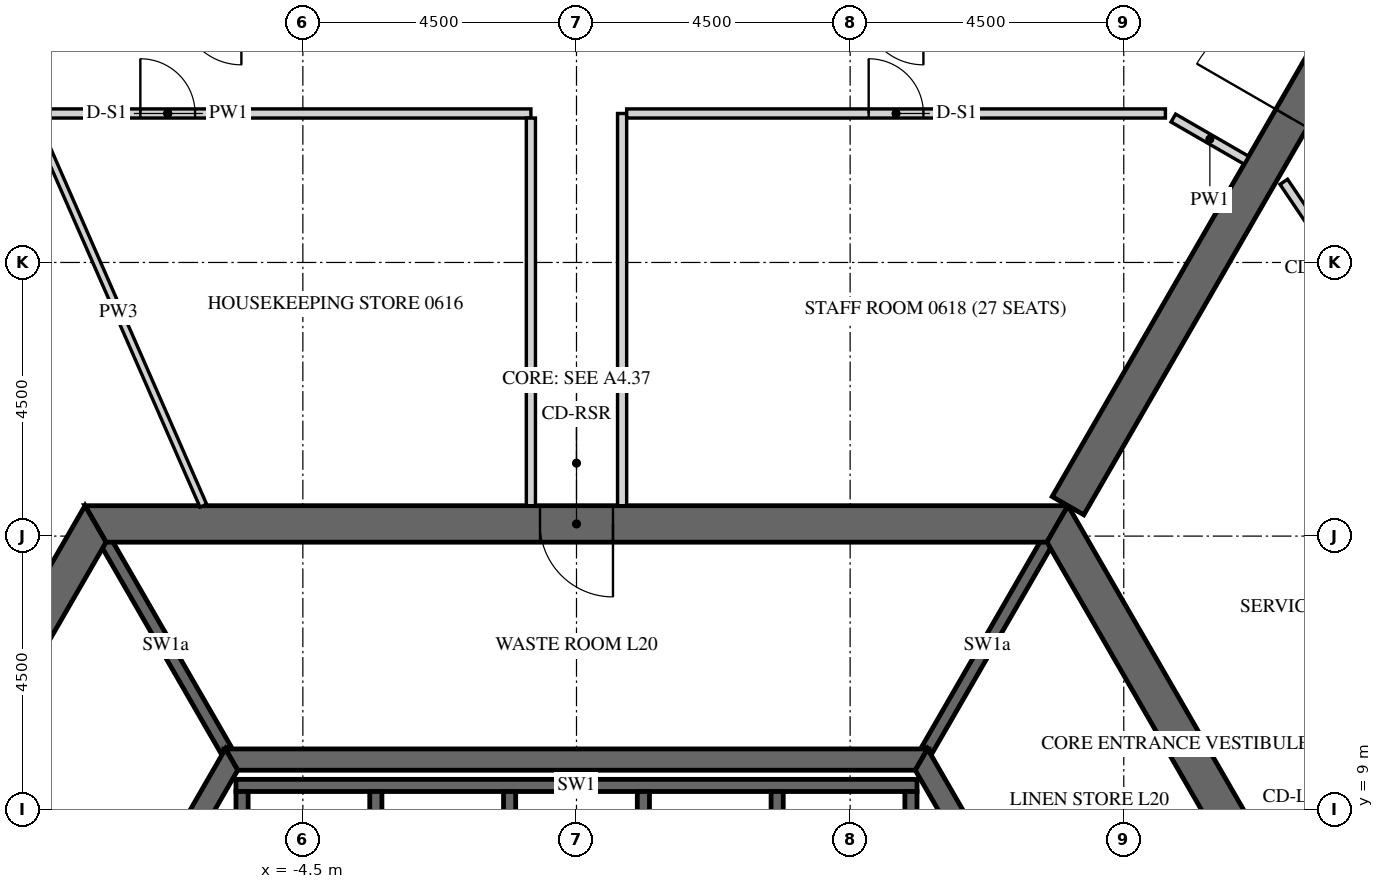
"""IFC4 building model, lengths in metres.
Left out: names, types, materials, properties, quantities, classifications, styles, units other than length and angle.
Written with IfcOpenShell. Run it as: python <this file> out.ifc"""

import sys

from ifc_helpers import new_model, si_unit, direction, frame, frame_2d, origin, place, context, subcontext, project, spatial, polyline, rectangle, outline, extrude, element, fill, save


model = new_model("IFC4")
c1 = context("Model", 3, precision=1e-05, world=origin(), true_north=direction((0.0, 1.0)))
c2 = subcontext(c1, "Body", "Model", "MODEL_VIEW")
j1 = project(units=[si_unit("LENGTHUNIT", "METRE"), si_unit("PLANEANGLEUNIT", "RADIAN")], contexts=[c1])
p1 = place(None, origin())
s1 = spatial("IfcSite", under=j1, at=p1, CompositionType="ELEMENT")
p2 = place(p1, origin())
s2 = spatial("IfcBuilding", under=s1, at=p2, CompositionType="ELEMENT")
p3 = place(p2, frame((0.0, 0.0, 92.1)))
s3 = spatial("IfcBuildingStorey", under=s2, at=p3, CompositionType="ELEMENT", Elevation=92.1)
p4 = place(p3, frame((-7.91, 13.7, -0.15), z_axis=(0.0, 0.0, 1.0), x_axis=(-0.499999880136, -0.866025472988, 0.0)))
e1 = element("IfcWall", 1, at=p4, inside=s3, PredefinedType="SHEAR", context=c2, shape_type="SweptSolid", body=[
    extrude(outline(polyline([(-0.173, -0.3), (15.993, -0.3), (15.646, 0.3), (0.173, 0.3), (-0.173, -0.3)])), origin(), (0.0, 0.0, 1.0), 3.9),
])
p5 = place(p4, frame((7.039, 0.0, 0.15)))
e2 = element("IfcOpeningElement", 2, at=p5, cuts=e1, PredefinedType="OPENING", context=c2, shape_type="SweptSolid", body=[
    extrude(rectangle(XDim=1.8, YDim=2.4, at=frame_2d((0.9, 1.2))), frame((0.0, 0.31, 0.0), z_axis=(0.0, -1.0, 0.0), x_axis=(1.0, 0.0, 0.0)), (0.0, 0.0, 1.0), 0.62),
])
p6 = place(p3, frame((15.819, 0.0, -0.15), z_axis=(0.0, 0.0, 1.0), x_axis=(-0.499999880136, 0.866025472988, 0.0)))
e3 = element("IfcWall", 3, at=p6, inside=s3, PredefinedType="SHEAR", context=c2, shape_type="SweptSolid", body=[
    extrude(outline(polyline([(-0.173, -0.3), (15.993, -0.3), (15.646, 0.3), (0.173, 0.3), (-0.173, -0.3)])), origin(), (0.0, 0.0, 1.0), 3.9),
])
p7 = place(p6, frame((6.981, 0.0, 0.15)))
e4 = element("IfcOpeningElement", 4, at=p7, cuts=e3, PredefinedType="OPENING", context=c2, shape_type="SweptSolid", body=[
    extrude(rectangle(XDim=1.8, YDim=2.4, at=frame_2d((0.9, 1.2))), frame((0.0, 0.31, 0.0), z_axis=(0.0, -1.0, 0.0), x_axis=(1.0, 0.0, 0.0)), (0.0, 0.0, 1.0), 0.62),
])
p8 = place(p3, frame((7.91, 13.7, -0.15), z_axis=(0.0, 0.0, 1.0), x_axis=(-1.0, 0.0, 0.0)))
e5 = element("IfcWall", 5, at=p8, inside=s3, PredefinedType="SHEAR", context=c2, shape_type="SweptSolid", body=[
    extrude(outline(polyline([(-0.173, -0.3), (15.993, -0.3), (15.646, 0.3), (0.173, 0.3), (-0.173, -0.3)])), origin(), (0.0, 0.0, 1.0), 3.9),
])
p9 = place(p8, frame((7.31, 0.0, 0.15)))
e6 = element("IfcOpeningElement", 6, at=p9, cuts=e5, PredefinedType="OPENING", context=c2, shape_type="SweptSolid", body=[
    extrude(rectangle(XDim=1.2, YDim=2.4, at=frame_2d((0.6, 1.2))), frame((0.0, 0.31, 0.0), z_axis=(0.0, -1.0, 0.0), x_axis=(1.0, 0.0, 0.0)), (0.0, 0.0, 1.0), 0.62),
])
p10 = place(p3, frame((8.083, 14.0, -0.15), z_axis=(0.0, 0.0, 1.0), x_axis=(0.499997680643, 0.866026742862, 0.0)))
e7 = element("IfcWall", 7, at=p10, inside=s3, PredefinedType="SHEAR", context=c2, shape_type="SweptSolid", body=[
    extrude(rectangle(XDim=16.509, YDim=0.6, at=frame_2d((8.254, 0.0))), origin(), (0.0, 0.0, 1.0), 3.9),
])
p11 = place(p10, frame((7.354, 0.0, 0.15)))
e8 = element("IfcOpeningElement", 8, at=p11, cuts=e7, PredefinedType="OPENING", context=c2, shape_type="SweptSolid", body=[
    extrude(rectangle(XDim=1.8, YDim=2.4, at=frame_2d((0.9, 1.2))), frame((0.0, 0.31, 0.0), z_axis=(0.0, -1.0, 0.0), x_axis=(1.0, 0.0, 0.0)), (0.0, 0.0, 1.0), 0.62),
])
p12 = place(p3, frame((-5.673, 9.825, -0.15), z_axis=(0.0, 0.0, 1.0), x_axis=(-0.499995046907, -0.866028263435, 0.0)))
e9 = element("IfcWall", 9, at=p12, inside=s3, PredefinedType="SHEAR", context=c2, shape_type="SweptSolid", body=[
    extrude(outline(polyline([(-0.101, -0.175), (11.446, -0.175), (11.244, 0.175), (0.101, 0.175), (-0.101, -0.175)])), origin(), (0.0, 0.0, 1.0), 3.9),
])
p13 = place(p12, frame((4.801, 0.0, 0.15)))
e10 = element("IfcOpeningElement", 10, at=p13, cuts=e9, PredefinedType="OPENING", context=c2, shape_type="SweptSolid", body=[
    extrude(rectangle(XDim=1.8, YDim=2.4, at=frame_2d((0.9, 1.2))), frame((0.0, 0.185, 0.0), z_axis=(0.0, -1.0, 0.0), x_axis=(1.0, 0.0, 0.0)), (0.0, 0.0, 1.0), 0.37),
])
p14 = place(p3, frame((11.345, 0.0, -0.15), z_axis=(0.0, 0.0, 1.0), x_axis=(-0.499995046907, 0.866028263435, 0.0)))
e11 = element("IfcWall", 11, at=p14, inside=s3, PredefinedType="SHEAR", context=c2, shape_type="SweptSolid", body=[
    extrude(outline(polyline([(-0.101, -0.175), (11.446, -0.175), (11.244, 0.175), (0.101, 0.175), (-0.101, -0.175)])), origin(), (0.0, 0.0, 1.0), 3.9),
])
p15 = place(p14, frame((4.744, 0.0, 0.15)))
e12 = element("IfcOpeningElement", 12, at=p15, cuts=e11, PredefinedType="OPENING", context=c2, shape_type="SweptSolid", body=[
    extrude(rectangle(XDim=1.8, YDim=2.4, at=frame_2d((0.9, 1.2))), frame((0.0, 0.185, 0.0), z_axis=(0.0, -1.0, 0.0), x_axis=(1.0, 0.0, 0.0)), (0.0, 0.0, 1.0), 0.37),
])
p16 = place(p3, frame((5.673, 9.825, -0.15), z_axis=(0.0, 0.0, 1.0), x_axis=(-1.0, 0.0, 0.0)))
e13 = element("IfcWall", 13, at=p16, inside=s3, PredefinedType="SHEAR", context=c2, shape_type="SweptSolid", body=[
    extrude(outline(polyline([(-0.101, -0.175), (11.446, -0.175), (11.244, 0.175), (0.101, 0.175), (-0.101, -0.175)])), origin(), (0.0, 0.0, 1.0), 3.9),
])
p17 = place(p3, frame((-5.6, 9.4, -0.25), z_axis=(0.0, 0.0, 1.0), x_axis=(1.0, 0.0, 0.0)))
e14 = element("IfcWall", 14, at=p17, inside=s3, PredefinedType="SHEAR", context=c2, shape_type="SweptSolid", body=[
    extrude(rectangle(XDim=11.2, YDim=0.2, at=frame_2d((5.6, 0.0))), origin(), (0.0, 0.0, 1.0), 3.9),
])
for number, where, z_axis, x_axis in (
    (15, (-5.5, 6.4, -0.25), (0.0, 0.0, 1.0), (0.0, 1.0, 0.0)),
    (16, (-3.3, 6.4, -0.25), (0.0, 0.0, 1.0), (0.0, 1.0, 0.0)),
    (17, (-1.1, 6.4, -0.25), (0.0, 0.0, 1.0), (0.0, 1.0, 0.0)),
    (18, (1.1, 6.4, -0.25), (0.0, 0.0, 1.0), (0.0, 1.0, 0.0)),
    (19, (3.3, 6.4, -0.25), (0.0, 0.0, 1.0), (0.0, 1.0, 0.0)),
    (20, (5.5, 6.4, -0.25), (0.0, 0.0, 1.0), (0.0, 1.0, 0.0)),
):
    element("IfcWall", number, at=place(p3, frame(where, z_axis=z_axis, x_axis=x_axis)), inside=s3, PredefinedType="SHEAR", context=c2, shape_type="SweptSolid", body=[
        extrude(rectangle(XDim=2.9, YDim=0.2, at=frame_2d((1.45, 0.0))), origin(), (0.0, 0.0, 1.0), 3.9),
    ])
for number, where, z_axis, x_axis in (
    (21, (5.773, 10.0, -0.15), (0.0, 0.0, 1.0), (0.5, 0.866, 0.0)),
    (22, (-5.773, 10.0, -0.15), (0.0, 0.0, 1.0), (-0.5, 0.866, 0.0)),
):
    element("IfcWall", number, at=place(p3, frame(where, z_axis=z_axis, x_axis=x_axis)), inside=s3, PredefinedType="SHEAR", context=c2, shape_type="SweptSolid", body=[
        extrude(rectangle(XDim=3.926, YDim=0.2, at=frame_2d((1.963, 0.0))), origin(), (0.0, 0.0, 1.0), 3.9),
    ])
p18 = place(p3, frame((-12.695, 20.45, 0.0), z_axis=(0.0, 0.0, 1.0), x_axis=(1.0, 0.0, 0.0)))
e23 = element("IfcWall", 23, at=p18, inside=s3, PredefinedType="PARTITIONING", context=c2, shape_type="SweptSolid", body=[
    extrude(rectangle(XDim=11.945, YDim=0.15, at=frame_2d((5.973, 0.0))), origin(), (0.0, 0.0, 1.0), 2.988),
])
p19 = place(p18, frame((5.522, 0.0, 0.0)))
e24 = element("IfcOpeningElement", 24, at=p19, cuts=e23, PredefinedType="OPENING", context=c2, shape_type="SweptSolid", body=[
    extrude(rectangle(XDim=0.9, YDim=2.1, at=frame_2d((0.45, 1.05))), frame((0.0, 0.085, 0.0), z_axis=(0.0, -1.0, 0.0), x_axis=(1.0, 0.0, 0.0)), (0.0, 0.0, 1.0), 0.17),
])
p20 = place(p3, frame((-0.75, 20.375, 0.0), z_axis=(0.0, 0.0, 1.0), x_axis=(0.0, -1.0, 0.0)))
e25 = element("IfcWall", 25, at=p20, inside=s3, PredefinedType="PARTITIONING", context=c2, shape_type="SweptSolid", body=[
    extrude(rectangle(XDim=6.375, YDim=0.15, at=frame_2d((3.188, 0.0))), origin(), (0.0, 0.0, 1.0), 2.988),
])
p21 = place(p3, frame((0.75, 14.0, 0.0), z_axis=(0.0, 0.0, 1.0), x_axis=(0.0, 1.0, 0.0)))
e26 = element("IfcWall", 26, at=p21, inside=s3, PredefinedType="PARTITIONING", context=c2, shape_type="SweptSolid", body=[
    extrude(rectangle(XDim=6.45, YDim=0.15, at=frame_2d((3.225, 0.0))), origin(), (0.0, 0.0, 1.0), 2.988),
])
p22 = place(p3, frame((0.825, 20.45, 0.0), z_axis=(0.0, 0.0, 1.0), x_axis=(1.0, 0.0, 0.0)))
e27 = element("IfcWall", 27, at=p22, inside=s3, PredefinedType="PARTITIONING", context=c2, shape_type="SweptSolid", body=[
    extrude(rectangle(XDim=8.86, YDim=0.15, at=frame_2d((4.43, 0.0))), origin(), (0.0, 0.0, 1.0), 2.988),
])
p23 = place(p22, frame((3.98, 0.0, 0.0)))
e28 = element("IfcOpeningElement", 28, at=p23, cuts=e27, PredefinedType="OPENING", context=c2, shape_type="SweptSolid", body=[
    extrude(rectangle(XDim=0.9, YDim=2.1, at=frame_2d((0.45, 1.05))), frame((0.0, 0.085, 0.0), z_axis=(0.0, -1.0, 0.0), x_axis=(1.0, 0.0, 0.0)), (0.0, 0.0, 1.0), 0.17),
])
p24 = place(p3, frame((9.815, 20.375, 0.0), z_axis=(0.0, 0.0, 1.0), x_axis=(0.86600392025, -0.500037208726, 0.0)))
e29 = element("IfcWall", 29, at=p24, inside=s3, PredefinedType="PARTITIONING", context=c2, shape_type="SweptSolid", body=[
    extrude(rectangle(XDim=1.388, YDim=0.15, at=frame_2d((0.694, 0.0))), origin(), (0.0, 0.0, 1.0), 2.988),
])
p25 = place(p3, frame((11.632, 19.326, 0.0), z_axis=(0.0, 0.0, 1.0), x_axis=(0.559193968377, -0.829036854266, 0.0)))
e30 = element("IfcWall", 30, at=p25, inside=s3, PredefinedType="PARTITIONING", context=c2, shape_type="SweptSolid", body=[
    extrude(rectangle(XDim=9.924, YDim=0.15, at=frame_2d((4.962, 0.0))), origin(), (0.0, 0.0, 1.0), 2.988),
])
p26 = place(p25, frame((4.512, 0.0, 0.0)))
e31 = element("IfcOpeningElement", 31, at=p26, cuts=e30, PredefinedType="OPENING", context=c2, shape_type="SweptSolid", body=[
    extrude(rectangle(XDim=0.9, YDim=2.1, at=frame_2d((0.45, 1.05))), frame((0.0, 0.085, 0.0), z_axis=(0.0, -1.0, 0.0), x_axis=(1.0, 0.0, 0.0)), (0.0, 0.0, 1.0), 0.17),
])
p27 = place(p3, frame((17.116, 11.061, 0.0), z_axis=(0.0, 0.0, 1.0), x_axis=(-0.866021127751, -0.500007406234, 0.0)))
e32 = element("IfcWall", 32, at=p27, inside=s3, PredefinedType="PARTITIONING", context=c2, shape_type="SweptSolid", body=[
    extrude(rectangle(XDim=6.354, YDim=0.15, at=frame_2d((3.177, 0.0))), origin(), (0.0, 0.0, 1.0), 2.988),
])
p28 = place(p3, frame((-8.932, 20.375, 0.0), z_axis=(0.0, 0.0, 1.0), x_axis=(0.401495831576, -0.915860850363, 0.0)))
e33 = element("IfcWall", 33, at=p28, inside=s3, PredefinedType="PARTITIONING", context=c2, shape_type="SweptSolid", body=[
    extrude(rectangle(XDim=6.961, YDim=0.12, at=frame_2d((3.48, 0.0))), origin(), (0.0, 0.0, 1.0), 2.988),
])
p29 = place(p9, origin())
e34 = element("IfcDoor", 34, at=p29, inside=s3, OperationType="SINGLE_SWING_LEFT", PredefinedType="DOOR", context=c2, shape_type="SweptSolid", body=[
    extrude(rectangle(XDim=1.2, YDim=2.4, at=frame_2d((0.6, 1.2))), frame((0.0, 0.025, 0.0), z_axis=(0.0, -1.0, 0.0), x_axis=(1.0, 0.0, 0.0)), (0.0, 0.0, 1.0), 0.05),
])
fill(e6, e34)
p30 = place(p11, origin())
e35 = element("IfcDoor", 35, at=p30, inside=s3, OperationType="DOUBLE_DOOR_SINGLE_SWING", PredefinedType="DOOR", context=c2, shape_type="SweptSolid", body=[
    extrude(rectangle(XDim=1.8, YDim=2.4, at=frame_2d((0.9, 1.2))), frame((0.0, 0.025, 0.0), z_axis=(0.0, -1.0, 0.0), x_axis=(1.0, 0.0, 0.0)), (0.0, 0.0, 1.0), 0.05),
])
fill(e8, e35)
p31 = place(p19, origin())
e36 = element("IfcDoor", 36, at=p31, inside=s3, OperationType="SINGLE_SWING_RIGHT", PredefinedType="DOOR", context=c2, shape_type="SweptSolid", body=[
    extrude(rectangle(XDim=0.9, YDim=2.1, at=frame_2d((0.45, 1.05))), frame((0.0, 0.025, 0.0), z_axis=(0.0, -1.0, 0.0), x_axis=(1.0, 0.0, 0.0)), (0.0, 0.0, 1.0), 0.05),
])
fill(e24, e36)
p32 = place(p23, origin())
e37 = element("IfcDoor", 37, at=p32, inside=s3, OperationType="SINGLE_SWING_LEFT", PredefinedType="DOOR", context=c2, shape_type="SweptSolid", body=[
    extrude(rectangle(XDim=0.9, YDim=2.1, at=frame_2d((0.45, 1.05))), frame((0.0, 0.025, 0.0), z_axis=(0.0, -1.0, 0.0), x_axis=(1.0, 0.0, 0.0)), (0.0, 0.0, 1.0), 0.05),
])
fill(e28, e37)
save(model, sys.argv[1])
